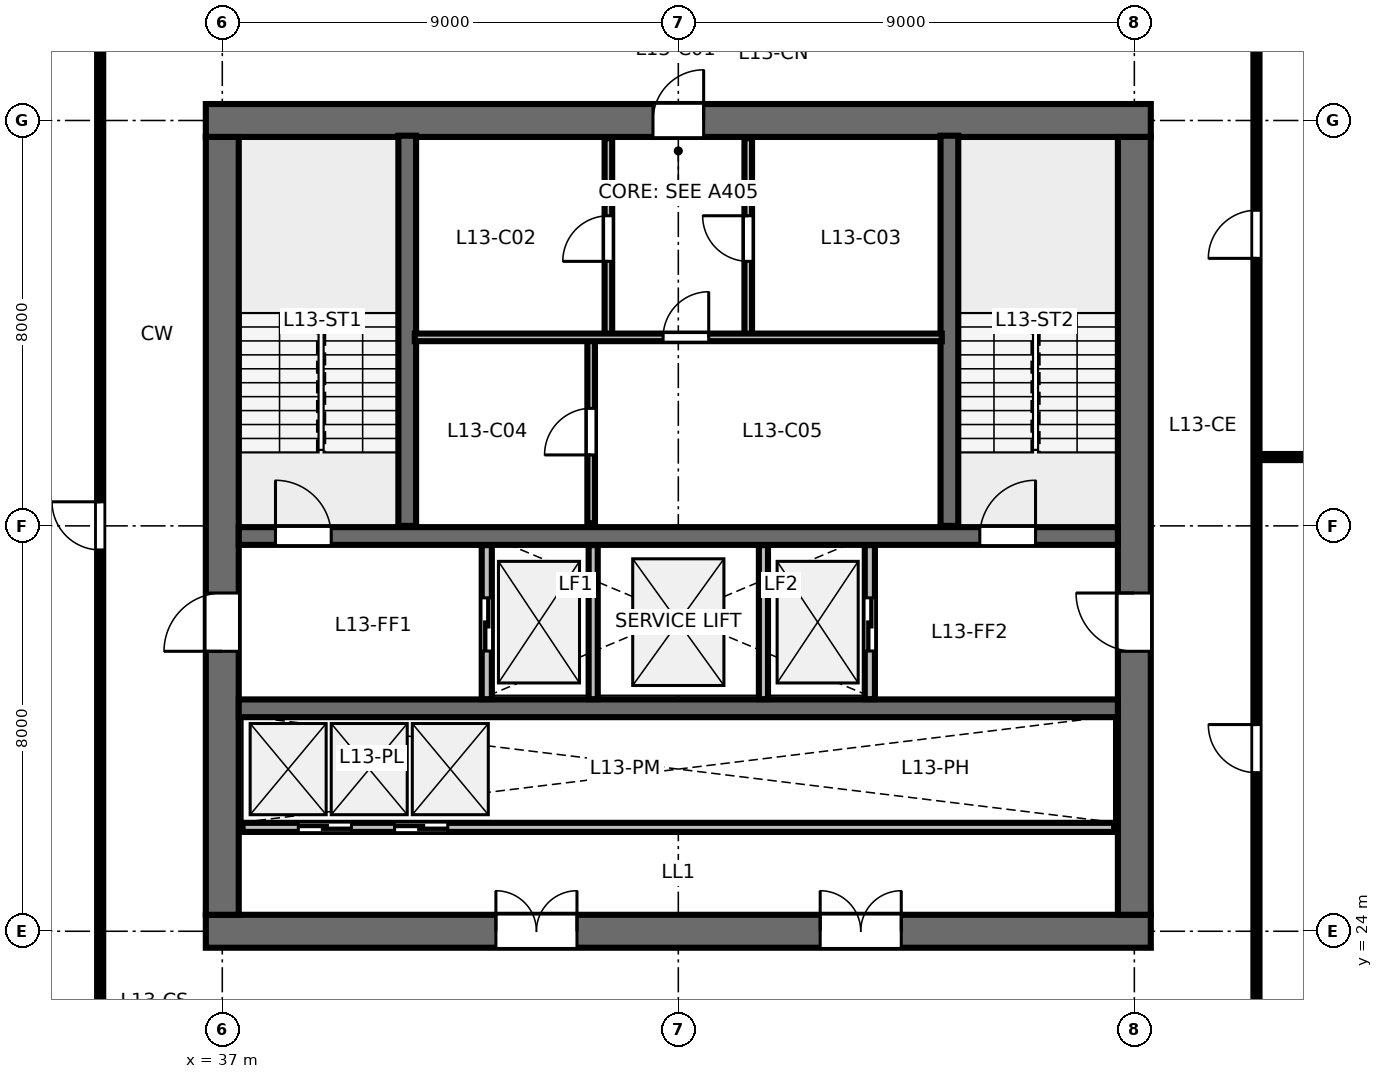
"""IFC4 building model, lengths in metres.
Left out: names, types, materials, properties, quantities, classifications, styles, units other than length and angle.
Written with IfcOpenShell. Run it as: python <this file> out.ifc"""

import sys

from ifc_helpers import new_model, si_unit, direction, frame, frame_2d, origin, place, context, subcontext, project, spatial, rectangle, extrude, element, fill, save


model = new_model("IFC4")
c1 = context("Model", 3, precision=1e-05, world=origin(), true_north=direction((0.0, 1.0)))
c2 = subcontext(c1, "Body", "Model", "MODEL_VIEW")
j1 = project(units=[si_unit("LENGTHUNIT", "METRE"), si_unit("PLANEANGLEUNIT", "RADIAN")], contexts=[c1])
p1 = place(None, origin())
s1 = spatial("IfcSite", under=j1, at=p1, CompositionType="ELEMENT")
p2 = place(p1, origin())
s2 = spatial("IfcBuilding", under=s1, at=p2, CompositionType="ELEMENT")
p3 = place(p2, frame((0.0, 0.0, 53.2)))
s3 = spatial("IfcBuildingStorey", under=s2, at=p3, CompositionType="ELEMENT", Elevation=53.2)
p4 = place(p3, frame((36.675, 24.0, 0.0), z_axis=(0.0, 0.0, 1.0), x_axis=(1.0, 0.0, 0.0)))
e1 = element("IfcWall", 1, at=p4, inside=s3, PredefinedType="SHEAR", context=c2, shape_type="SweptSolid", body=[
    extrude(rectangle(XDim=18.65, YDim=0.65, at=frame_2d((9.325, 0.0))), origin(), (0.0, 0.0, 1.0), 3.36),
])
p5 = place(p4, frame((5.725, 0.0, 0.0)))
e2 = element("IfcOpeningElement", 2, at=p5, cuts=e1, PredefinedType="OPENING", context=c2, shape_type="SweptSolid", body=[
    extrude(rectangle(XDim=1.6, YDim=2.15, at=frame_2d((0.8, 1.075))), frame((0.0, 0.335, 0.0), z_axis=(0.0, -1.0, 0.0), x_axis=(1.0, 0.0, 0.0)), (0.0, 0.0, 1.0), 0.67),
])
p6 = place(p4, frame((12.125, 0.0, 0.0)))
e3 = element("IfcOpeningElement", 3, at=p6, cuts=e1, PredefinedType="OPENING", context=c2, shape_type="SweptSolid", body=[
    extrude(rectangle(XDim=1.6, YDim=2.15, at=frame_2d((0.8, 1.075))), frame((0.0, 0.335, 0.0), z_axis=(0.0, -1.0, 0.0), x_axis=(1.0, 0.0, 0.0)), (0.0, 0.0, 1.0), 0.67),
])
p7 = place(p3, frame((36.675, 40.0, 0.0), z_axis=(0.0, 0.0, 1.0), x_axis=(1.0, 0.0, 0.0)))
e4 = element("IfcWall", 4, at=p7, inside=s3, PredefinedType="SHEAR", context=c2, shape_type="SweptSolid", body=[
    extrude(rectangle(XDim=18.65, YDim=0.65, at=frame_2d((9.325, 0.0))), origin(), (0.0, 0.0, 1.0), 3.36),
])
p8 = place(p7, frame((8.825, 0.0, 0.0)))
e5 = element("IfcOpeningElement", 5, at=p8, cuts=e4, PredefinedType="OPENING", context=c2, shape_type="SweptSolid", body=[
    extrude(rectangle(XDim=1.0, YDim=2.15, at=frame_2d((0.5, 1.075))), frame((0.0, 0.335, 0.0), z_axis=(0.0, -1.0, 0.0), x_axis=(1.0, 0.0, 0.0)), (0.0, 0.0, 1.0), 0.67),
])
p9 = place(p3, frame((37.0, 24.325, 0.0), z_axis=(0.0, 0.0, 1.0), x_axis=(0.0, 1.0, 0.0)))
e6 = element("IfcWall", 6, at=p9, inside=s3, PredefinedType="SHEAR", context=c2, shape_type="SweptSolid", body=[
    extrude(rectangle(XDim=15.35, YDim=0.65, at=frame_2d((7.675, 0.0))), origin(), (0.0, 0.0, 1.0), 3.36),
])
p10 = place(p9, frame((5.2, 0.0, 0.0)))
e7 = element("IfcOpeningElement", 7, at=p10, cuts=e6, PredefinedType="OPENING", context=c2, shape_type="SweptSolid", body=[
    extrude(rectangle(XDim=1.15, YDim=2.15, at=frame_2d((0.575, 1.075))), frame((0.0, 0.335, 0.0), z_axis=(0.0, -1.0, 0.0), x_axis=(1.0, 0.0, 0.0)), (0.0, 0.0, 1.0), 0.67),
])
p11 = place(p3, frame((55.0, 24.325, 0.0), z_axis=(0.0, 0.0, 1.0), x_axis=(0.0, 1.0, 0.0)))
e8 = element("IfcWall", 8, at=p11, inside=s3, PredefinedType="SHEAR", context=c2, shape_type="SweptSolid", body=[
    extrude(rectangle(XDim=15.35, YDim=0.65, at=frame_2d((7.675, 0.0))), origin(), (0.0, 0.0, 1.0), 3.36),
])
p12 = place(p11, frame((5.2, 0.0, 0.0)))
e9 = element("IfcOpeningElement", 9, at=p12, cuts=e8, PredefinedType="OPENING", context=c2, shape_type="SweptSolid", body=[
    extrude(rectangle(XDim=1.15, YDim=2.15, at=frame_2d((0.575, 1.075))), frame((0.0, 0.335, 0.0), z_axis=(0.0, -1.0, 0.0), x_axis=(1.0, 0.0, 0.0)), (0.0, 0.0, 1.0), 0.67),
])
p13 = place(p3, frame((37.325, 31.8, 0.0), z_axis=(0.0, 0.0, 1.0), x_axis=(1.0, 0.0, 0.0)))
e10 = element("IfcWall", 10, at=p13, inside=s3, PredefinedType="SHEAR", context=c2, shape_type="SweptSolid", body=[
    extrude(rectangle(XDim=17.35, YDim=0.35, at=frame_2d((8.675, 0.0))), origin(), (0.0, 0.0, 1.0), 3.36),
])
p14 = place(p13, frame((0.725, 0.0, 0.0)))
e11 = element("IfcOpeningElement", 11, at=p14, cuts=e10, PredefinedType="OPENING", context=c2, shape_type="SweptSolid", body=[
    extrude(rectangle(XDim=1.1, YDim=2.15, at=frame_2d((0.55, 1.075))), frame((0.0, 0.185, 0.0), z_axis=(0.0, -1.0, 0.0), x_axis=(1.0, 0.0, 0.0)), (0.0, 0.0, 1.0), 0.37),
])
p15 = place(p13, frame((14.625, 0.0, 0.0)))
e12 = element("IfcOpeningElement", 12, at=p15, cuts=e10, PredefinedType="OPENING", context=c2, shape_type="SweptSolid", body=[
    extrude(rectangle(XDim=1.1, YDim=2.15, at=frame_2d((0.55, 1.075))), frame((0.0, 0.185, 0.0), z_axis=(0.0, -1.0, 0.0), x_axis=(1.0, 0.0, 0.0)), (0.0, 0.0, 1.0), 0.37),
])
p16 = place(p3, frame((37.325, 28.4, 0.0), z_axis=(0.0, 0.0, 1.0), x_axis=(1.0, 0.0, 0.0)))
e13 = element("IfcWall", 13, at=p16, inside=s3, PredefinedType="SHEAR", context=c2, shape_type="SweptSolid", body=[
    extrude(rectangle(XDim=17.35, YDim=0.35, at=frame_2d((8.675, 0.0))), origin(), (0.0, 0.0, 1.0), 3.36),
])
for number, where, z_axis, x_axis in (
    (14, (40.65, 32.0, 0.0), (0.0, 0.0, 1.0), (0.0, 1.0, 0.0)),
    (15, (51.35, 32.0, 0.0), (0.0, 0.0, 1.0), (0.0, 1.0, 0.0)),
):
    element("IfcWall", number, at=place(p3, frame(where, z_axis=z_axis, x_axis=x_axis)), inside=s3, PredefinedType="SHEAR", context=c2, shape_type="SweptSolid", body=[
        extrude(rectangle(XDim=7.7, YDim=0.35, at=frame_2d((3.85, 0.0))), origin(), (0.0, 0.0, 1.0), 3.6),
    ])
p17 = place(p3, frame((44.62, 35.72, 0.0), z_axis=(0.0, 0.0, 1.0), x_axis=(0.0, 1.0, 0.0)))
e16 = element("IfcWall", 16, at=p17, inside=s3, PredefinedType="PARTITIONING", context=c2, shape_type="SweptSolid", body=[
    extrude(rectangle(XDim=3.93, YDim=0.15, at=frame_2d((1.965, 0.0))), origin(), (0.0, 0.0, 1.0), 3.36),
])
p18 = place(p17, frame((1.5, 0.0, 0.0)))
e17 = element("IfcOpeningElement", 17, at=p18, cuts=e16, PredefinedType="OPENING", context=c2, shape_type="SweptSolid", body=[
    extrude(rectangle(XDim=0.9, YDim=2.15, at=frame_2d((0.45, 1.075))), frame((0.0, 0.085, 0.0), z_axis=(0.0, -1.0, 0.0), x_axis=(1.0, 0.0, 0.0)), (0.0, 0.0, 1.0), 0.17),
])
p19 = place(p3, frame((47.38, 35.72, 0.0), z_axis=(0.0, 0.0, 1.0), x_axis=(0.0, 1.0, 0.0)))
e18 = element("IfcWall", 18, at=p19, inside=s3, PredefinedType="PARTITIONING", context=c2, shape_type="SweptSolid", body=[
    extrude(rectangle(XDim=3.93, YDim=0.15, at=frame_2d((1.965, 0.0))), origin(), (0.0, 0.0, 1.0), 3.36),
])
p20 = place(p19, frame((1.5, 0.0, 0.0)))
e19 = element("IfcOpeningElement", 19, at=p20, cuts=e18, PredefinedType="OPENING", context=c2, shape_type="SweptSolid", body=[
    extrude(rectangle(XDim=0.9, YDim=2.15, at=frame_2d((0.45, 1.075))), frame((0.0, 0.085, 0.0), z_axis=(0.0, -1.0, 0.0), x_axis=(1.0, 0.0, 0.0)), (0.0, 0.0, 1.0), 0.17),
])
p21 = place(p3, frame((44.28, 32.05, 0.0), z_axis=(0.0, 0.0, 1.0), x_axis=(0.0, 1.0, 0.0)))
e20 = element("IfcWall", 20, at=p21, inside=s3, PredefinedType="PARTITIONING", context=c2, shape_type="SweptSolid", body=[
    extrude(rectangle(XDim=3.67, YDim=0.15, at=frame_2d((1.835, 0.0))), origin(), (0.0, 0.0, 1.0), 3.36),
])
p22 = place(p21, frame((1.35, 0.0, 0.0)))
e21 = element("IfcOpeningElement", 21, at=p22, cuts=e20, PredefinedType="OPENING", context=c2, shape_type="SweptSolid", body=[
    extrude(rectangle(XDim=0.92, YDim=2.15, at=frame_2d((0.46, 1.075))), frame((0.0, 0.085, 0.0), z_axis=(0.0, -1.0, 0.0), x_axis=(1.0, 0.0, 0.0)), (0.0, 0.0, 1.0), 0.17),
])
p23 = place(p3, frame((40.8, 35.72, 0.0), z_axis=(0.0, 0.0, 1.0), x_axis=(1.0, 0.0, 0.0)))
e22 = element("IfcWall", 22, at=p23, inside=s3, PredefinedType="PARTITIONING", context=c2, shape_type="SweptSolid", body=[
    extrude(rectangle(XDim=10.4, YDim=0.15, at=frame_2d((5.2, 0.0))), origin(), (0.0, 0.0, 1.0), 3.36),
])
p24 = place(p23, frame((4.9, 0.0, 0.0)))
e23 = element("IfcOpeningElement", 23, at=p24, cuts=e22, PredefinedType="OPENING", context=c2, shape_type="SweptSolid", body=[
    extrude(rectangle(XDim=0.9, YDim=2.15, at=frame_2d((0.45, 1.075))), frame((0.0, 0.085, 0.0), z_axis=(0.0, -1.0, 0.0), x_axis=(1.0, 0.0, 0.0)), (0.0, 0.0, 1.0), 0.17),
])
p25 = place(p3, frame((42.22, 28.58, 0.0), z_axis=(0.0, 0.0, 1.0), x_axis=(0.0, 1.0, 0.0)))
e24 = element("IfcWall", 24, at=p25, inside=s3, PredefinedType="PARTITIONING", context=c2, shape_type="SweptSolid", body=[
    extrude(rectangle(XDim=3.04, YDim=0.2, at=frame_2d((1.52, 0.0))), origin(), (0.0, 0.0, 1.0), 3.36),
])
p26 = place(p25, frame((0.95, 0.0, 0.0)))
e25 = element("IfcOpeningElement", 25, at=p26, cuts=e24, PredefinedType="OPENING", context=c2, shape_type="SweptSolid", body=[
    extrude(rectangle(XDim=1.05, YDim=2.15, at=frame_2d((0.525, 1.075))), frame((0.0, 0.11, 0.0), z_axis=(0.0, -1.0, 0.0), x_axis=(1.0, 0.0, 0.0)), (0.0, 0.0, 1.0), 0.22),
])
p27 = place(p3, frame((49.78, 28.58, 0.0), z_axis=(0.0, 0.0, 1.0), x_axis=(0.0, 1.0, 0.0)))
e26 = element("IfcWall", 26, at=p27, inside=s3, PredefinedType="PARTITIONING", context=c2, shape_type="SweptSolid", body=[
    extrude(rectangle(XDim=3.04, YDim=0.2, at=frame_2d((1.52, 0.0))), origin(), (0.0, 0.0, 1.0), 3.36),
])
p28 = place(p27, frame((0.95, 0.0, 0.0)))
e27 = element("IfcOpeningElement", 27, at=p28, cuts=e26, PredefinedType="OPENING", context=c2, shape_type="SweptSolid", body=[
    extrude(rectangle(XDim=1.05, YDim=2.15, at=frame_2d((0.525, 1.075))), frame((0.0, 0.11, 0.0), z_axis=(0.0, -1.0, 0.0), x_axis=(1.0, 0.0, 0.0)), (0.0, 0.0, 1.0), 0.22),
])
for number, where, z_axis, x_axis in (
    (28, (44.32, 28.58, 0.0), (0.0, 0.0, 1.0), (0.0, 1.0, 0.0)),
    (29, (47.68, 28.58, 0.0), (0.0, 0.0, 1.0), (0.0, 1.0, 0.0)),
):
    element("IfcWall", number, at=place(p3, frame(where, z_axis=z_axis, x_axis=x_axis)), inside=s3, PredefinedType="PARTITIONING", context=c2, shape_type="SweptSolid", body=[
        extrude(rectangle(XDim=3.04, YDim=0.18, at=frame_2d((1.52, 0.0))), origin(), (0.0, 0.0, 1.0), 3.36),
    ])
p29 = place(p3, frame((37.4, 26.05, 0.0), z_axis=(0.0, 0.0, 1.0), x_axis=(1.0, 0.0, 0.0)))
e30 = element("IfcWall", 30, at=p29, inside=s3, PredefinedType="PARTITIONING", context=c2, shape_type="SweptSolid", body=[
    extrude(rectangle(XDim=17.2, YDim=0.18, at=frame_2d((8.6, 0.0))), origin(), (0.0, 0.0, 1.0), 3.36),
])
p30 = place(p29, frame((1.1, 0.0, 0.0)))
e31 = element("IfcOpeningElement", 31, at=p30, cuts=e30, PredefinedType="OPENING", context=c2, shape_type="SweptSolid", body=[
    extrude(rectangle(XDim=1.05, YDim=2.15, at=frame_2d((0.525, 1.075))), frame((0.0, 0.1, 0.0), z_axis=(0.0, -1.0, 0.0), x_axis=(1.0, 0.0, 0.0)), (0.0, 0.0, 1.0), 0.2),
])
p31 = place(p29, frame((3.0, 0.0, 0.0)))
e32 = element("IfcOpeningElement", 32, at=p31, cuts=e30, PredefinedType="OPENING", context=c2, shape_type="SweptSolid", body=[
    extrude(rectangle(XDim=1.05, YDim=2.15, at=frame_2d((0.525, 1.075))), frame((0.0, 0.1, 0.0), z_axis=(0.0, -1.0, 0.0), x_axis=(1.0, 0.0, 0.0)), (0.0, 0.0, 1.0), 0.2),
])
p32 = place(p3, frame((34.59, 21.65, 0.0), z_axis=(0.0, 0.0, 1.0), x_axis=(0.0, 1.0, 0.0)))
e33 = element("IfcWall", 33, at=p32, inside=s3, PredefinedType="PARTITIONING", context=c2, shape_type="SweptSolid", body=[
    extrude(rectangle(XDim=20.7, YDim=0.12, at=frame_2d((10.35, 0.0))), origin(), (0.0, 0.0, 1.0), 2.64),
])
p33 = place(p32, frame((9.875, 0.0, 0.0)))
e34 = element("IfcOpeningElement", 34, at=p33, cuts=e33, PredefinedType="OPENING", context=c2, shape_type="SweptSolid", body=[
    extrude(rectangle(XDim=0.95, YDim=2.15, at=frame_2d((0.475, 1.075))), frame((0.0, 0.07, 0.0), z_axis=(0.0, -1.0, 0.0), x_axis=(1.0, 0.0, 0.0)), (0.0, 0.0, 1.0), 0.14),
])
p34 = place(p3, frame((57.41, 33.358, 0.0), z_axis=(0.0, 0.0, 1.0), x_axis=(1.0, 0.0, 0.0)))
e35 = element("IfcWall", 35, at=p34, inside=s3, PredefinedType="PARTITIONING", context=c2, shape_type="SweptSolid", body=[
    extrude(rectangle(XDim=12.71, YDim=0.12, at=frame_2d((6.355, 0.0))), origin(), (0.0, 0.0, 1.0), 2.64),
])
p35 = place(p34, frame((1.4, 0.0, 0.0)))
e36 = element("IfcOpeningElement", 36, at=p35, cuts=e35, PredefinedType="OPENING", context=c2, shape_type="SweptSolid", body=[
    extrude(rectangle(XDim=0.9, YDim=2.15, at=frame_2d((0.45, 1.075))), frame((0.0, 0.07, 0.0), z_axis=(0.0, -1.0, 0.0), x_axis=(1.0, 0.0, 0.0)), (0.0, 0.0, 1.0), 0.14),
])
p36 = place(p3, frame((57.41, 21.65, 0.0), z_axis=(0.0, 0.0, 1.0), x_axis=(0.0, 1.0, 0.0)))
e37 = element("IfcWall", 37, at=p36, inside=s3, PredefinedType="PARTITIONING", context=c2, shape_type="SweptSolid", body=[
    extrude(rectangle(XDim=20.7, YDim=0.12, at=frame_2d((10.35, 0.0))), origin(), (0.0, 0.0, 1.0), 2.64),
])
p37 = place(p36, frame((5.479, 0.0, 0.0)))
e38 = element("IfcOpeningElement", 38, at=p37, cuts=e37, PredefinedType="OPENING", context=c2, shape_type="SweptSolid", body=[
    extrude(rectangle(XDim=0.95, YDim=2.15, at=frame_2d((0.475, 1.075))), frame((0.0, 0.07, 0.0), z_axis=(0.0, -1.0, 0.0), x_axis=(1.0, 0.0, 0.0)), (0.0, 0.0, 1.0), 0.14),
])
p38 = place(p36, frame((15.629, 0.0, 0.0)))
e39 = element("IfcOpeningElement", 39, at=p38, cuts=e37, PredefinedType="OPENING", context=c2, shape_type="SweptSolid", body=[
    extrude(rectangle(XDim=0.95, YDim=2.15, at=frame_2d((0.475, 1.075))), frame((0.0, 0.07, 0.0), z_axis=(0.0, -1.0, 0.0), x_axis=(1.0, 0.0, 0.0)), (0.0, 0.0, 1.0), 0.14),
])
p39 = place(p14, origin())
e40 = element("IfcDoor", 40, at=p39, inside=s3, OperationType="SINGLE_SWING_LEFT", PredefinedType="DOOR", context=c2, shape_type="SweptSolid", body=[
    extrude(rectangle(XDim=1.1, YDim=2.15, at=frame_2d((0.55, 1.075))), frame((0.0, 0.025, 0.0), z_axis=(0.0, -1.0, 0.0), x_axis=(1.0, 0.0, 0.0)), (0.0, 0.0, 1.0), 0.05),
])
fill(e11, e40)
p40 = place(p15, origin())
e41 = element("IfcDoor", 41, at=p40, inside=s3, OperationType="SINGLE_SWING_RIGHT", PredefinedType="DOOR", context=c2, shape_type="SweptSolid", body=[
    extrude(rectangle(XDim=1.1, YDim=2.15, at=frame_2d((0.55, 1.075))), frame((0.0, 0.025, 0.0), z_axis=(0.0, -1.0, 0.0), x_axis=(1.0, 0.0, 0.0)), (0.0, 0.0, 1.0), 0.05),
])
fill(e12, e41)
p41 = place(p8, origin())
e42 = element("IfcDoor", 42, at=p41, inside=s3, OperationType="SINGLE_SWING_RIGHT", PredefinedType="DOOR", context=c2, shape_type="SweptSolid", body=[
    extrude(rectangle(XDim=1.0, YDim=2.15, at=frame_2d((0.5, 1.075))), frame((0.0, 0.025, 0.0), z_axis=(0.0, -1.0, 0.0), x_axis=(1.0, 0.0, 0.0)), (0.0, 0.0, 1.0), 0.05),
])
fill(e5, e42)
p42 = place(p10, origin())
e43 = element("IfcDoor", 43, at=p42, inside=s3, OperationType="SINGLE_SWING_LEFT", PredefinedType="DOOR", context=c2, shape_type="SweptSolid", body=[
    extrude(rectangle(XDim=1.15, YDim=2.15, at=frame_2d((0.575, 1.075))), frame((0.0, 0.025, 0.0), z_axis=(0.0, -1.0, 0.0), x_axis=(1.0, 0.0, 0.0)), (0.0, 0.0, 1.0), 0.05),
])
fill(e7, e43)
p43 = place(p12, origin())
e44 = element("IfcDoor", 44, at=p43, inside=s3, OperationType="SINGLE_SWING_RIGHT", PredefinedType="DOOR", context=c2, shape_type="SweptSolid", body=[
    extrude(rectangle(XDim=1.15, YDim=2.15, at=frame_2d((0.575, 1.075))), frame((0.0, 0.025, 0.0), z_axis=(0.0, -1.0, 0.0), x_axis=(1.0, 0.0, 0.0)), (0.0, 0.0, 1.0), 0.05),
])
fill(e9, e44)
p44 = place(p5, origin())
e45 = element("IfcDoor", 45, at=p44, inside=s3, OperationType="DOUBLE_DOOR_SINGLE_SWING", PredefinedType="DOOR", context=c2, shape_type="SweptSolid", body=[
    extrude(rectangle(XDim=1.6, YDim=2.15, at=frame_2d((0.8, 1.075))), frame((0.0, 0.025, 0.0), z_axis=(0.0, -1.0, 0.0), x_axis=(1.0, 0.0, 0.0)), (0.0, 0.0, 1.0), 0.05),
])
fill(e2, e45)
p45 = place(p6, origin())
e46 = element("IfcDoor", 46, at=p45, inside=s3, OperationType="DOUBLE_DOOR_SINGLE_SWING", PredefinedType="DOOR", context=c2, shape_type="SweptSolid", body=[
    extrude(rectangle(XDim=1.6, YDim=2.15, at=frame_2d((0.8, 1.075))), frame((0.0, 0.025, 0.0), z_axis=(0.0, -1.0, 0.0), x_axis=(1.0, 0.0, 0.0)), (0.0, 0.0, 1.0), 0.05),
])
fill(e3, e46)
p46 = place(p18, origin())
e47 = element("IfcDoor", 47, at=p46, inside=s3, OperationType="SINGLE_SWING_LEFT", PredefinedType="DOOR", context=c2, shape_type="SweptSolid", body=[
    extrude(rectangle(XDim=0.9, YDim=2.15, at=frame_2d((0.45, 1.075))), frame((0.0, 0.025, 0.0), z_axis=(0.0, -1.0, 0.0), x_axis=(1.0, 0.0, 0.0)), (0.0, 0.0, 1.0), 0.05),
])
fill(e17, e47)
p47 = place(p20, origin())
e48 = element("IfcDoor", 48, at=p47, inside=s3, OperationType="SINGLE_SWING_RIGHT", PredefinedType="DOOR", context=c2, shape_type="SweptSolid", body=[
    extrude(rectangle(XDim=0.9, YDim=2.15, at=frame_2d((0.45, 1.075))), frame((0.0, 0.025, 0.0), z_axis=(0.0, -1.0, 0.0), x_axis=(1.0, 0.0, 0.0)), (0.0, 0.0, 1.0), 0.05),
])
fill(e19, e48)
p48 = place(p22, origin())
e49 = element("IfcDoor", 49, at=p48, inside=s3, OperationType="SINGLE_SWING_LEFT", PredefinedType="DOOR", context=c2, shape_type="SweptSolid", body=[
    extrude(rectangle(XDim=0.92, YDim=2.15, at=frame_2d((0.46, 1.075))), frame((0.0, 0.025, 0.0), z_axis=(0.0, -1.0, 0.0), x_axis=(1.0, 0.0, 0.0)), (0.0, 0.0, 1.0), 0.05),
])
fill(e21, e49)
p49 = place(p24, origin())
e50 = element("IfcDoor", 50, at=p49, inside=s3, OperationType="SINGLE_SWING_RIGHT", PredefinedType="DOOR", context=c2, shape_type="SweptSolid", body=[
    extrude(rectangle(XDim=0.9, YDim=2.15, at=frame_2d((0.45, 1.075))), frame((0.0, 0.025, 0.0), z_axis=(0.0, -1.0, 0.0), x_axis=(1.0, 0.0, 0.0)), (0.0, 0.0, 1.0), 0.05),
])
fill(e23, e50)
p50 = place(p26, origin())
e51 = element("IfcDoor", 51, at=p50, inside=s3, OperationType="SLIDING_TO_LEFT", PredefinedType="DOOR", context=c2, shape_type="SweptSolid", body=[
    extrude(rectangle(XDim=1.05, YDim=2.15, at=frame_2d((0.525, 1.075))), frame((0.0, 0.025, 0.0), z_axis=(0.0, -1.0, 0.0), x_axis=(1.0, 0.0, 0.0)), (0.0, 0.0, 1.0), 0.05),
])
fill(e25, e51)
p51 = place(p28, origin())
e52 = element("IfcDoor", 52, at=p51, inside=s3, OperationType="SLIDING_TO_RIGHT", PredefinedType="DOOR", context=c2, shape_type="SweptSolid", body=[
    extrude(rectangle(XDim=1.05, YDim=2.15, at=frame_2d((0.525, 1.075))), frame((0.0, 0.025, 0.0), z_axis=(0.0, -1.0, 0.0), x_axis=(1.0, 0.0, 0.0)), (0.0, 0.0, 1.0), 0.05),
])
fill(e27, e52)
p52 = place(p30, origin())
e53 = element("IfcDoor", 53, at=p52, inside=s3, OperationType="SLIDING_TO_LEFT", PredefinedType="DOOR", context=c2, shape_type="SweptSolid", body=[
    extrude(rectangle(XDim=1.05, YDim=2.15, at=frame_2d((0.525, 1.075))), frame((0.0, 0.025, 0.0), z_axis=(0.0, -1.0, 0.0), x_axis=(1.0, 0.0, 0.0)), (0.0, 0.0, 1.0), 0.05),
])
fill(e31, e53)
p53 = place(p31, origin())
e54 = element("IfcDoor", 54, at=p53, inside=s3, OperationType="SLIDING_TO_RIGHT", PredefinedType="DOOR", context=c2, shape_type="SweptSolid", body=[
    extrude(rectangle(XDim=1.05, YDim=2.15, at=frame_2d((0.525, 1.075))), frame((0.0, 0.025, 0.0), z_axis=(0.0, -1.0, 0.0), x_axis=(1.0, 0.0, 0.0)), (0.0, 0.0, 1.0), 0.05),
])
fill(e32, e54)
p54 = place(p33, origin())
e55 = element("IfcDoor", 55, at=p54, inside=s3, OperationType="SINGLE_SWING_RIGHT", PredefinedType="DOOR", context=c2, shape_type="SweptSolid", body=[
    extrude(rectangle(XDim=0.95, YDim=2.15, at=frame_2d((0.475, 1.075))), frame((0.0, 0.025, 0.0), z_axis=(0.0, -1.0, 0.0), x_axis=(1.0, 0.0, 0.0)), (0.0, 0.0, 1.0), 0.05),
])
fill(e34, e55)
p55 = place(p37, origin())
e56 = element("IfcDoor", 56, at=p55, inside=s3, OperationType="SINGLE_SWING_RIGHT", PredefinedType="DOOR", context=c2, shape_type="SweptSolid", body=[
    extrude(rectangle(XDim=0.95, YDim=2.15, at=frame_2d((0.475, 1.075))), frame((0.0, 0.025, 0.0), z_axis=(0.0, -1.0, 0.0), x_axis=(1.0, 0.0, 0.0)), (0.0, 0.0, 1.0), 0.05),
])
fill(e38, e56)
p56 = place(p38, origin())
e57 = element("IfcDoor", 57, at=p56, inside=s3, OperationType="SINGLE_SWING_LEFT", PredefinedType="DOOR", context=c2, shape_type="SweptSolid", body=[
    extrude(rectangle(XDim=0.95, YDim=2.15, at=frame_2d((0.475, 1.075))), frame((0.0, 0.025, 0.0), z_axis=(0.0, -1.0, 0.0), x_axis=(1.0, 0.0, 0.0)), (0.0, 0.0, 1.0), 0.05),
])
fill(e39, e57)
save(model, sys.argv[1])
